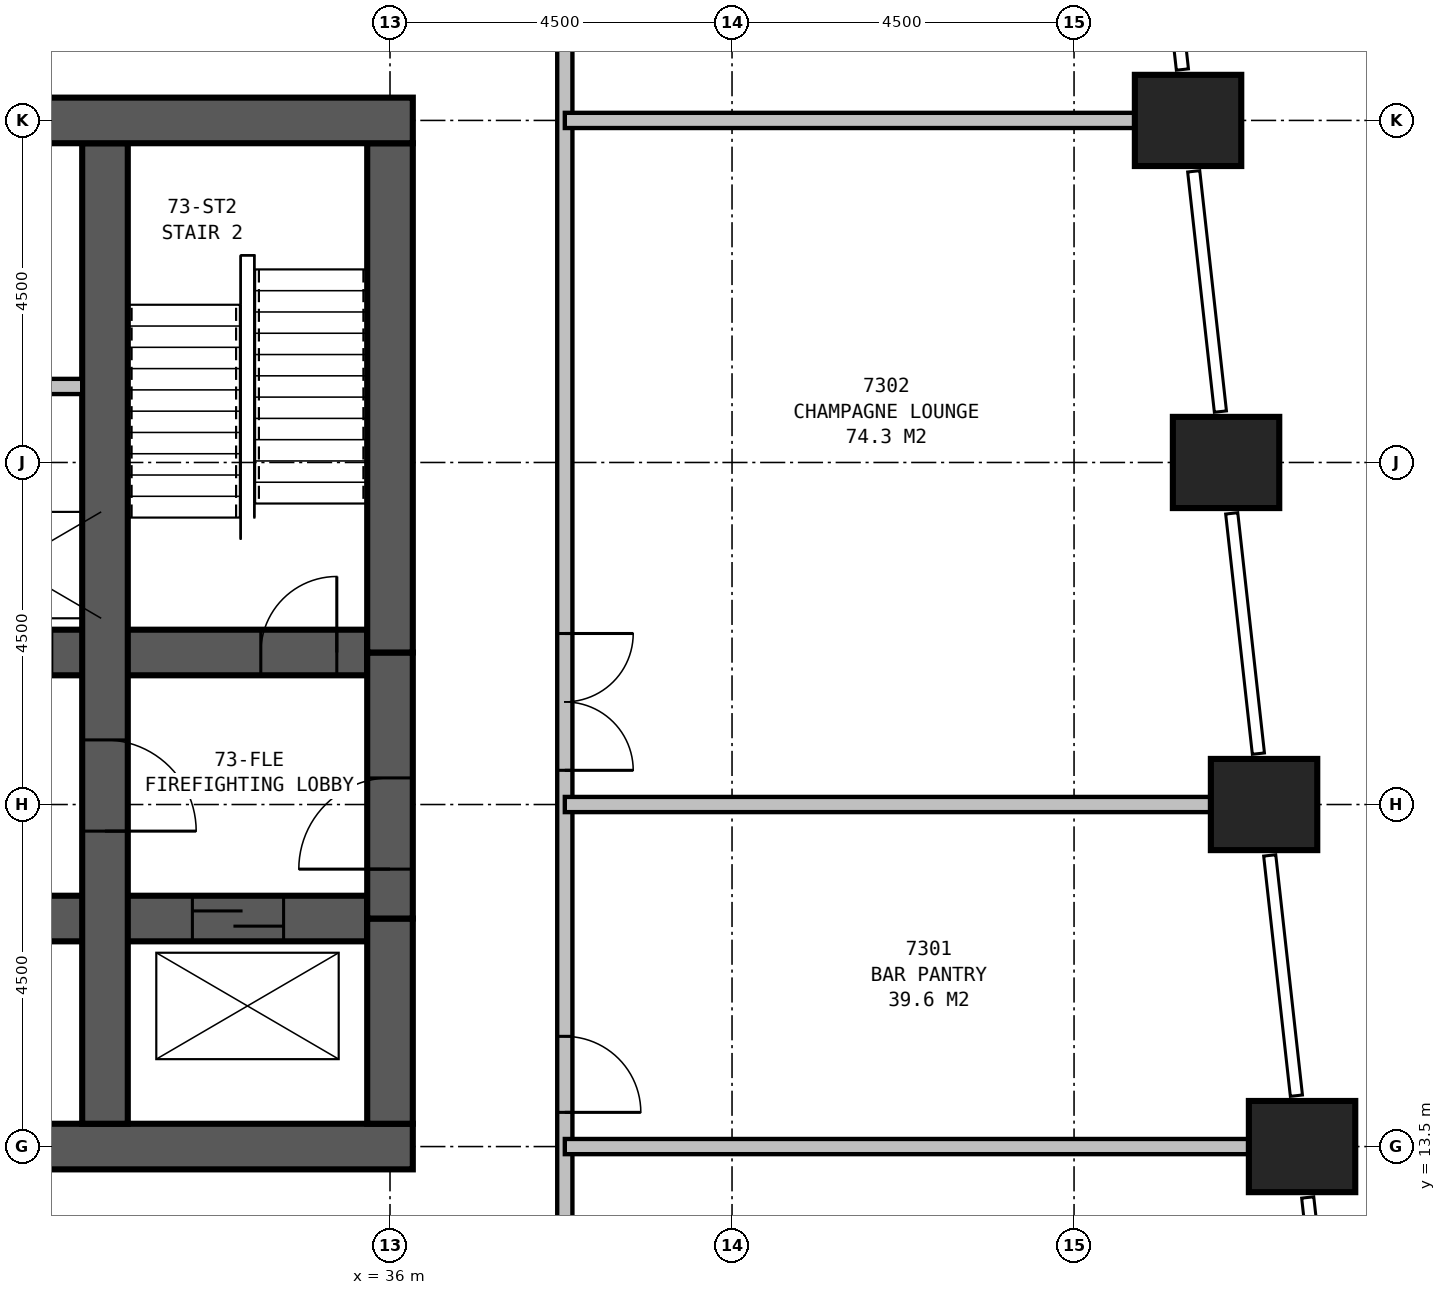
"""IFC4 building model, lengths in metres.
Left out: names, types, materials, properties, quantities, classifications, styles, units other than length and angle.
Written with IfcOpenShell. Run it as: python <this file> out.ifc"""

import sys

from ifc_helpers import new_model, si_unit, direction, frame, frame_2d, origin, origin_2d, place, context, subcontext, project, spatial, rectangle, extrude, element, fill, save


model = new_model("IFC4")
c1 = context("Model", 3, precision=1e-05, world=origin(), true_north=direction((0.0, 1.0)))
c2 = subcontext(c1, "Body", "Model", "MODEL_VIEW")
j1 = project(units=[si_unit("LENGTHUNIT", "METRE"), si_unit("PLANEANGLEUNIT", "RADIAN")], contexts=[c1])
p1 = place(None, origin())
s1 = spatial("IfcSite", under=j1, at=p1, CompositionType="ELEMENT")
p2 = place(p1, origin())
s2 = spatial("IfcBuilding", under=s1, at=p2, CompositionType="ELEMENT")
p3 = place(p2, frame((0.0, 0.0, 285.8)))
s3 = spatial("IfcBuildingStorey", under=s2, at=p3, CompositionType="ELEMENT", Elevation=285.8)
for number, where, z_axis, x_axis in (
    (1, (48.0, 13.5, 0.0), (0.0, 0.0, 1.0), (1.0, 0.0, 0.0)),
    (2, (47.5, 18.0, 0.0), (0.0, 0.0, 1.0), (1.0, 0.0, 0.0)),
    (3, (47.0, 22.5, 0.0), (0.0, 0.0, 1.0), (1.0, 0.0, 0.0)),
    (4, (46.5, 27.0, 0.0), (0.0, 0.0, 1.0), (1.0, 0.0, 0.0)),
):
    element("IfcColumn", number, at=place(p3, frame(where, z_axis=z_axis, x_axis=x_axis)), inside=s3, PredefinedType="COLUMN", context=c2, shape_type="SweptSolid", body=[
        extrude(rectangle(XDim=1.4, YDim=1.2, at=origin_2d()), origin(), (0.0, 0.0, 1.0), 3.9),
    ])
p4 = place(p3, frame((13.2, 13.5, 0.0), z_axis=(0.0, 0.0, 1.0), x_axis=(1.0, 0.0, 0.0)))
e5 = element("IfcWall", 5, at=p4, inside=s3, PredefinedType="SHEAR", context=c2, shape_type="SweptSolid", body=[
    extrude(rectangle(XDim=23.1, YDim=0.6, at=frame_2d((11.55, 0.0))), origin(), (0.0, 0.0, 1.0), 3.9),
])
p5 = place(p3, frame((36.3, 27.0, 0.0), z_axis=(0.0, 0.0, 1.0), x_axis=(-1.0, 0.0, 0.0)))
e6 = element("IfcWall", 6, at=p5, inside=s3, PredefinedType="SHEAR", context=c2, shape_type="SweptSolid", body=[
    extrude(rectangle(XDim=23.6, YDim=0.6, at=frame_2d((11.8, 0.0))), origin(), (0.0, 0.0, 1.0), 3.9),
])
p6 = place(p5, frame((17.05, 0.0, 0.0)))
e7 = element("IfcOpeningElement", 7, at=p6, cuts=e6, PredefinedType="OPENING", context=c2, shape_type="SweptSolid", body=[
    extrude(rectangle(XDim=1.0, YDim=2.1, at=frame_2d((0.5, 1.05))), frame((0.0, 0.31, 0.0), z_axis=(0.0, -1.0, 0.0), x_axis=(1.0, 0.0, 0.0)), (0.0, 0.0, 1.0), 0.62),
])
p7 = place(p5, frame((12.05, 0.0, 0.0)))
e8 = element("IfcOpeningElement", 8, at=p7, cuts=e6, PredefinedType="OPENING", context=c2, shape_type="SweptSolid", body=[
    extrude(rectangle(XDim=1.0, YDim=2.1, at=frame_2d((0.5, 1.05))), frame((0.0, 0.31, 0.0), z_axis=(0.0, -1.0, 0.0), x_axis=(1.0, 0.0, 0.0)), (0.0, 0.0, 1.0), 0.62),
])
p8 = place(p5, frame((7.05, 0.0, 0.0)))
e9 = element("IfcOpeningElement", 9, at=p8, cuts=e6, PredefinedType="OPENING", context=c2, shape_type="SweptSolid", body=[
    extrude(rectangle(XDim=1.0, YDim=2.1, at=frame_2d((0.5, 1.05))), frame((0.0, 0.31, 0.0), z_axis=(0.0, -1.0, 0.0), x_axis=(1.0, 0.0, 0.0)), (0.0, 0.0, 1.0), 0.62),
])
p9 = place(p3, frame((32.25, 13.8, 0.0), z_axis=(0.0, 0.0, 1.0), x_axis=(0.0, 1.0, 0.0)))
e10 = element("IfcWall", 10, at=p9, inside=s3, PredefinedType="SHEAR", context=c2, shape_type="SweptSolid", body=[
    extrude(rectangle(XDim=12.9, YDim=0.6, at=frame_2d((6.45, 0.0))), origin(), (0.0, 0.0, 1.0), 3.9),
])
p10 = place(p9, frame((5.05, 0.0, 0.0), z_axis=(0.0, 0.0, 1.0), x_axis=(-1.0, 0.0, 0.0)))
e11 = element("IfcOpeningElement", 11, at=p10, cuts=e10, PredefinedType="OPENING", context=c2, shape_type="SweptSolid", body=[
    extrude(rectangle(XDim=1.2, YDim=2.1, at=frame_2d((0.6, 1.05))), frame((0.0, 0.31, 0.0), z_axis=(0.0, -1.0, 0.0), x_axis=(1.0, 0.0, 0.0)), (0.0, 0.0, 1.0), 0.62),
])
p11 = place(p3, frame((13.8, 16.5, 0.0), z_axis=(0.0, 0.0, 1.0), x_axis=(1.0, 0.0, 0.0)))
e12 = element("IfcWall", 12, at=p11, inside=s3, PredefinedType="SHEAR", context=c2, shape_type="SweptSolid", body=[
    extrude(rectangle(XDim=21.9, YDim=0.6, at=frame_2d((10.95, 0.0))), origin(), (0.0, 0.0, 1.0), 3.9),
])
p12 = place(p11, frame((5.75, 0.0, 0.0), z_axis=(0.0, 0.0, 1.0), x_axis=(-1.0, 0.0, 0.0)))
e13 = element("IfcOpeningElement", 13, at=p12, cuts=e12, PredefinedType="OPENING", context=c2, shape_type="SweptSolid", body=[
    extrude(rectangle(XDim=1.0, YDim=2.1, at=frame_2d((0.5, 1.05))), frame((0.0, 0.31, 0.0), z_axis=(0.0, -1.0, 0.0), x_axis=(1.0, 0.0, 0.0)), (0.0, 0.0, 1.0), 0.62),
])
p13 = place(p11, frame((10.2, 0.0, 0.0), z_axis=(0.0, 0.0, 1.0), x_axis=(-1.0, 0.0, 0.0)))
e14 = element("IfcOpeningElement", 14, at=p13, cuts=e12, PredefinedType="OPENING", context=c2, shape_type="SweptSolid", body=[
    extrude(rectangle(XDim=1.0, YDim=2.1, at=frame_2d((0.5, 1.05))), frame((0.0, 0.31, 0.0), z_axis=(0.0, -1.0, 0.0), x_axis=(1.0, 0.0, 0.0)), (0.0, 0.0, 1.0), 0.62),
])
p14 = place(p11, frame((12.7, 0.0, 0.0), z_axis=(0.0, 0.0, 1.0), x_axis=(-1.0, 0.0, 0.0)))
e15 = element("IfcOpeningElement", 15, at=p14, cuts=e12, PredefinedType="OPENING", context=c2, shape_type="SweptSolid", body=[
    extrude(rectangle(XDim=1.0, YDim=2.1, at=frame_2d((0.5, 1.05))), frame((0.0, 0.31, 0.0), z_axis=(0.0, -1.0, 0.0), x_axis=(1.0, 0.0, 0.0)), (0.0, 0.0, 1.0), 0.62),
])
p15 = place(p11, frame((17.15, 0.0, 0.0), z_axis=(0.0, 0.0, 1.0), x_axis=(-1.0, 0.0, 0.0)))
e16 = element("IfcOpeningElement", 16, at=p15, cuts=e12, PredefinedType="OPENING", context=c2, shape_type="SweptSolid", body=[
    extrude(rectangle(XDim=1.0, YDim=2.1, at=frame_2d((0.5, 1.05))), frame((0.0, 0.31, 0.0), z_axis=(0.0, -1.0, 0.0), x_axis=(1.0, 0.0, 0.0)), (0.0, 0.0, 1.0), 0.62),
])
p16 = place(p11, frame((0.6, 0.0, 0.0)))
e17 = element("IfcOpeningElement", 17, at=p16, cuts=e12, PredefinedType="OPENING", context=c2, shape_type="SweptSolid", body=[
    extrude(rectangle(XDim=1.2, YDim=2.1, at=frame_2d((0.6, 1.05))), frame((0.0, 0.31, 0.0), z_axis=(0.0, -1.0, 0.0), x_axis=(1.0, 0.0, 0.0)), (0.0, 0.0, 1.0), 0.62),
])
p17 = place(p11, frame((19.6, 0.0, 0.0)))
e18 = element("IfcOpeningElement", 18, at=p17, cuts=e12, PredefinedType="OPENING", context=c2, shape_type="SweptSolid", body=[
    extrude(rectangle(XDim=1.2, YDim=2.1, at=frame_2d((0.6, 1.05))), frame((0.0, 0.31, 0.0), z_axis=(0.0, -1.0, 0.0), x_axis=(1.0, 0.0, 0.0)), (0.0, 0.0, 1.0), 0.62),
])
p18 = place(p3, frame((13.8, 20.0, 0.0), z_axis=(0.0, 0.0, 1.0), x_axis=(1.0, 0.0, 0.0)))
e19 = element("IfcWall", 19, at=p18, inside=s3, PredefinedType="SHEAR", context=c2, shape_type="SweptSolid", body=[
    extrude(rectangle(XDim=21.9, YDim=0.6, at=frame_2d((10.95, 0.0))), origin(), (0.0, 0.0, 1.0), 3.9),
])
p19 = place(p18, frame((0.5, 0.0, 0.0)))
e20 = element("IfcOpeningElement", 20, at=p19, cuts=e19, PredefinedType="OPENING", context=c2, shape_type="SweptSolid", body=[
    extrude(rectangle(XDim=1.0, YDim=2.1, at=frame_2d((0.5, 1.05))), frame((0.0, 0.31, 0.0), z_axis=(0.0, -1.0, 0.0), x_axis=(1.0, 0.0, 0.0)), (0.0, 0.0, 1.0), 0.62),
])
p20 = place(p18, frame((20.5, 0.0, 0.0)))
e21 = element("IfcOpeningElement", 21, at=p20, cuts=e19, PredefinedType="OPENING", context=c2, shape_type="SweptSolid", body=[
    extrude(rectangle(XDim=1.0, YDim=2.1, at=frame_2d((0.5, 1.05))), frame((0.0, 0.31, 0.0), z_axis=(0.0, -1.0, 0.0), x_axis=(1.0, 0.0, 0.0)), (0.0, 0.0, 1.0), 0.62),
])
p21 = place(p18, frame((9.15, 0.0, 0.0)))
e22 = element("IfcOpeningElement", 22, at=p21, cuts=e19, PredefinedType="OPENING", context=c2, shape_type="SweptSolid", body=[
    extrude(rectangle(XDim=1.1, YDim=2.1, at=frame_2d((0.55, 1.05))), frame((0.0, 0.31, 0.0), z_axis=(0.0, -1.0, 0.0), x_axis=(1.0, 0.0, 0.0)), (0.0, 0.0, 1.0), 0.62),
])
p22 = place(p18, frame((11.65, 0.0, 0.0)))
e23 = element("IfcOpeningElement", 23, at=p22, cuts=e19, PredefinedType="OPENING", context=c2, shape_type="SweptSolid", body=[
    extrude(rectangle(XDim=1.1, YDim=2.1, at=frame_2d((0.55, 1.05))), frame((0.0, 0.31, 0.0), z_axis=(0.0, -1.0, 0.0), x_axis=(1.0, 0.0, 0.0)), (0.0, 0.0, 1.0), 0.62),
])
p23 = place(p18, frame((14.15, 0.0, 0.0)))
e24 = element("IfcOpeningElement", 24, at=p23, cuts=e19, PredefinedType="OPENING", context=c2, shape_type="SweptSolid", body=[
    extrude(rectangle(XDim=1.1, YDim=2.1, at=frame_2d((0.55, 1.05))), frame((0.0, 0.31, 0.0), z_axis=(0.0, -1.0, 0.0), x_axis=(1.0, 0.0, 0.0)), (0.0, 0.0, 1.0), 0.62),
])
p24 = place(p18, frame((16.65, 0.0, 0.0)))
e25 = element("IfcOpeningElement", 25, at=p24, cuts=e19, PredefinedType="OPENING", context=c2, shape_type="SweptSolid", body=[
    extrude(rectangle(XDim=1.1, YDim=2.1, at=frame_2d((0.55, 1.05))), frame((0.0, 0.31, 0.0), z_axis=(0.0, -1.0, 0.0), x_axis=(1.0, 0.0, 0.0)), (0.0, 0.0, 1.0), 0.62),
])
p25 = place(p18, frame((5.75, 0.0, 0.0), z_axis=(0.0, 0.0, 1.0), x_axis=(-1.0, 0.0, 0.0)))
e26 = element("IfcOpeningElement", 26, at=p25, cuts=e19, PredefinedType="OPENING", context=c2, shape_type="SweptSolid", body=[
    extrude(rectangle(XDim=1.0, YDim=2.1, at=frame_2d((0.5, 1.05))), frame((0.0, 0.31, 0.0), z_axis=(0.0, -1.0, 0.0), x_axis=(1.0, 0.0, 0.0)), (0.0, 0.0, 1.0), 0.62),
])
p26 = place(p18, frame((6.7, 0.0, 0.0)))
e27 = element("IfcOpeningElement", 27, at=p26, cuts=e19, PredefinedType="OPENING", context=c2, shape_type="SweptSolid", body=[
    extrude(rectangle(XDim=1.0, YDim=2.1, at=frame_2d((0.5, 1.05))), frame((0.0, 0.31, 0.0), z_axis=(0.0, -1.0, 0.0), x_axis=(1.0, 0.0, 0.0)), (0.0, 0.0, 1.0), 0.62),
])
p27 = place(p3, frame((36.0, 13.8, 0.0), z_axis=(0.0, 0.0, 1.0), x_axis=(0.0, 1.0, 0.0)))
e28 = element("IfcWall", 28, at=p27, inside=s3, PredefinedType="SHEAR", context=c2, shape_type="SweptSolid", body=[
    extrude(rectangle(XDim=2.7, YDim=0.6, at=frame_2d((1.35, 0.0))), origin(), (0.0, 0.0, 1.0), 3.9),
])
p28 = place(p3, frame((36.0, 16.5, 0.0), z_axis=(0.0, 0.0, 1.0), x_axis=(0.0, 1.0, 0.0)))
e29 = element("IfcWall", 29, at=p28, inside=s3, PredefinedType="SHEAR", context=c2, shape_type="SweptSolid", body=[
    extrude(rectangle(XDim=3.5, YDim=0.6, at=frame_2d((1.75, 0.0))), origin(), (0.0, 0.0, 1.0), 3.9),
])
p29 = place(p28, frame((0.65, 0.0, 0.0)))
e30 = element("IfcOpeningElement", 30, at=p29, cuts=e29, PredefinedType="OPENING", context=c2, shape_type="SweptSolid", body=[
    extrude(rectangle(XDim=1.2, YDim=2.1, at=frame_2d((0.6, 1.05))), frame((0.0, 0.31, 0.0), z_axis=(0.0, -1.0, 0.0), x_axis=(1.0, 0.0, 0.0)), (0.0, 0.0, 1.0), 0.62),
])
p30 = place(p3, frame((36.0, 20.0, 0.0), z_axis=(0.0, 0.0, 1.0), x_axis=(0.0, 1.0, 0.0)))
e31 = element("IfcWall", 31, at=p30, inside=s3, PredefinedType="SHEAR", context=c2, shape_type="SweptSolid", body=[
    extrude(rectangle(XDim=6.7, YDim=0.6, at=frame_2d((3.35, 0.0))), origin(), (0.0, 0.0, 1.0), 3.9),
])
p31 = place(p3, frame((38.3, 11.2, 0.0), z_axis=(0.0, 0.0, 1.0), x_axis=(0.0, 1.0, 0.0)))
e32 = element("IfcWall", 32, at=p31, inside=s3, PredefinedType="PARTITIONING", context=c2, shape_type="SweptSolid", body=[
    extrude(rectangle(XDim=18.1, YDim=0.2, at=frame_2d((9.05, 0.0))), origin(), (0.0, 0.0, 1.0), 3.65),
])
p32 = place(p31, frame((3.75, 0.0, 0.0), z_axis=(0.0, 0.0, 1.0), x_axis=(-1.0, 0.0, 0.0)))
e33 = element("IfcOpeningElement", 33, at=p32, cuts=e32, PredefinedType="OPENING", context=c2, shape_type="SweptSolid", body=[
    extrude(rectangle(XDim=1.0, YDim=2.1, at=frame_2d((0.5, 1.05))), frame((0.0, 0.11, 0.0), z_axis=(0.0, -1.0, 0.0), x_axis=(1.0, 0.0, 0.0)), (0.0, 0.0, 1.0), 0.22),
])
p33 = place(p31, frame((9.05, 0.0, 0.0), z_axis=(0.0, 0.0, 1.0), x_axis=(-1.0, 0.0, 0.0)))
e34 = element("IfcOpeningElement", 34, at=p33, cuts=e32, PredefinedType="OPENING", context=c2, shape_type="SweptSolid", body=[
    extrude(rectangle(XDim=1.8, YDim=2.4, at=frame_2d((0.9, 1.2))), frame((0.0, 0.11, 0.0), z_axis=(0.0, -1.0, 0.0), x_axis=(1.0, 0.0, 0.0)), (0.0, 0.0, 1.0), 0.22),
])
p34 = place(p3, frame((38.3, 13.5, 0.0), z_axis=(0.0, 0.0, 1.0), x_axis=(1.0, 0.0, 0.0)))
e35 = element("IfcWall", 35, at=p34, inside=s3, PredefinedType="PARTITIONING", context=c2, shape_type="SweptSolid", body=[
    extrude(rectangle(XDim=8.999, YDim=0.2, at=frame_2d((4.5, 0.0))), origin(), (0.0, 0.0, 1.0), 2.3),
])
p35 = place(p3, frame((38.3, 18.0, 0.0), z_axis=(0.0, 0.0, 1.0), x_axis=(1.0, 0.0, 0.0)))
e36 = element("IfcWall", 36, at=p35, inside=s3, PredefinedType="PARTITIONING", context=c2, shape_type="SweptSolid", body=[
    extrude(rectangle(XDim=8.499, YDim=0.2, at=frame_2d((4.25, 0.0))), origin(), (0.0, 0.0, 1.0), 2.7),
])
p36 = place(p3, frame((38.3, 27.0, 0.0), z_axis=(0.0, 0.0, 1.0), x_axis=(1.0, 0.0, 0.0)))
e37 = element("IfcWall", 37, at=p36, inside=s3, PredefinedType="PARTITIONING", context=c2, shape_type="SweptSolid", body=[
    extrude(rectangle(XDim=7.499, YDim=0.2, at=frame_2d((3.75, 0.0))), origin(), (0.0, 0.0, 1.0), 2.3),
])
p37 = place(p3, frame((17.55, 23.5, 0.0), z_axis=(0.0, 0.0, 1.0), x_axis=(1.0, 0.0, 0.0)))
e38 = element("IfcWall", 38, at=p37, inside=s3, PredefinedType="PARTITIONING", context=c2, shape_type="SweptSolid", body=[
    extrude(rectangle(XDim=14.4, YDim=0.2, at=frame_2d((7.2, 0.0))), origin(), (0.0, 0.0, 1.0), 3.65),
])
p38 = place(p37, frame((0.45, 0.0, 0.0)))
e39 = element("IfcOpeningElement", 39, at=p38, cuts=e38, PredefinedType="OPENING", context=c2, shape_type="SweptSolid", body=[
    extrude(rectangle(XDim=1.0, YDim=2.1, at=frame_2d((0.5, 1.05))), frame((0.0, 0.11, 0.0), z_axis=(0.0, -1.0, 0.0), x_axis=(1.0, 0.0, 0.0)), (0.0, 0.0, 1.0), 0.22),
])
p39 = place(p32, origin())
e40 = element("IfcDoor", 40, at=p39, inside=s3, OperationType="SINGLE_SWING_RIGHT", PredefinedType="DOOR", context=c2, shape_type="SweptSolid", body=[
    extrude(rectangle(XDim=1.0, YDim=2.1, at=frame_2d((0.5, 1.05))), frame((0.0, 0.025, 0.0), z_axis=(0.0, -1.0, 0.0), x_axis=(1.0, 0.0, 0.0)), (0.0, 0.0, 1.0), 0.05),
])
fill(e33, e40)
p40 = place(p33, origin())
e41 = element("IfcDoor", 41, at=p40, inside=s3, OperationType="DOUBLE_DOOR_SINGLE_SWING", PredefinedType="DOOR", context=c2, shape_type="SweptSolid", body=[
    extrude(rectangle(XDim=1.8, YDim=2.4, at=frame_2d((0.9, 1.2))), frame((0.0, 0.025, 0.0), z_axis=(0.0, -1.0, 0.0), x_axis=(1.0, 0.0, 0.0)), (0.0, 0.0, 1.0), 0.05),
])
fill(e34, e41)
p41 = place(p29, origin())
e42 = element("IfcDoor", 42, at=p41, inside=s3, OperationType="SINGLE_SWING_LEFT", PredefinedType="DOOR", context=c2, shape_type="SweptSolid", body=[
    extrude(rectangle(XDim=1.2, YDim=2.1, at=frame_2d((0.6, 1.05))), frame((0.0, 0.3, 0.0), z_axis=(0.0, -1.0, 0.0), x_axis=(1.0, 0.0, 0.0)), (0.0, 0.0, 1.0), 0.6),
])
fill(e30, e42)
p42 = place(p10, origin())
e43 = element("IfcDoor", 43, at=p42, inside=s3, OperationType="SINGLE_SWING_RIGHT", PredefinedType="DOOR", context=c2, shape_type="SweptSolid", body=[
    extrude(rectangle(XDim=1.2, YDim=2.1, at=frame_2d((0.6, 1.05))), frame((0.0, 0.3, 0.0), z_axis=(0.0, -1.0, 0.0), x_axis=(1.0, 0.0, 0.0)), (0.0, 0.0, 1.0), 0.6),
])
fill(e11, e43)
p43 = place(p20, origin())
e44 = element("IfcDoor", 44, at=p43, inside=s3, OperationType="SINGLE_SWING_RIGHT", PredefinedType="DOOR", context=c2, shape_type="SweptSolid", body=[
    extrude(rectangle(XDim=1.0, YDim=2.1, at=frame_2d((0.5, 1.05))), frame((0.0, 0.3, 0.0), z_axis=(0.0, -1.0, 0.0), x_axis=(1.0, 0.0, 0.0)), (0.0, 0.0, 1.0), 0.6),
])
fill(e21, e44)
p44 = place(p17, origin())
e45 = element("IfcDoor", 45, at=p44, inside=s3, OperationType="SLIDING_TO_LEFT", PredefinedType="DOOR", context=c2, shape_type="SweptSolid", body=[
    extrude(rectangle(XDim=1.2, YDim=2.1, at=frame_2d((0.6, 1.05))), frame((0.0, 0.3, 0.0), z_axis=(0.0, -1.0, 0.0), x_axis=(1.0, 0.0, 0.0)), (0.0, 0.0, 1.0), 0.6),
])
fill(e18, e45)
save(model, sys.argv[1])
